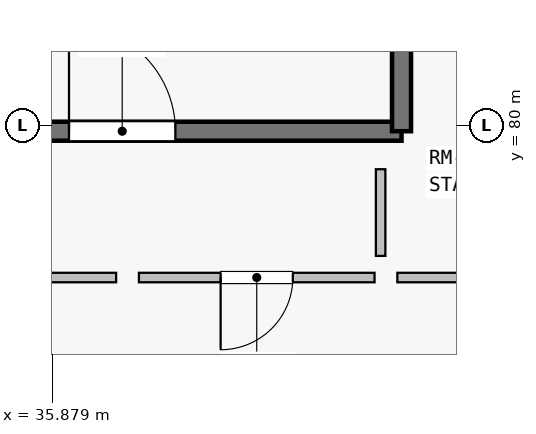
"""IFC4 building model, lengths in metres.
Left out: names, types, materials, properties, quantities, classifications, styles, units other than length and angle.
Written with IfcOpenShell. Run it as: python <this file> out.ifc"""

import sys

from ifc_helpers import new_model, si_unit, direction, frame, frame_2d, origin, place, context, subcontext, project, spatial, rectangle, extrude, element, fill, save


model = new_model("IFC4")
c1 = context("Model", 3, precision=1e-05, world=origin(), true_north=direction((0.0, 1.0)))
c2 = subcontext(c1, "Body", "Model", "MODEL_VIEW")
j1 = project(units=[si_unit("LENGTHUNIT", "METRE"), si_unit("PLANEANGLEUNIT", "RADIAN")], contexts=[c1])
p1 = place(None, origin())
s1 = spatial("IfcSite", under=j1, at=p1, CompositionType="ELEMENT")
p2 = place(p1, origin())
s2 = spatial("IfcBuilding", under=s1, at=p2, CompositionType="ELEMENT")
p3 = place(p2, frame((0.0, 0.0, 5.4)))
s3 = spatial("IfcBuildingStorey", under=s2, at=p3, CompositionType="ELEMENT", Elevation=5.4)
p4 = place(p3, frame((33.125, 79.925, 0.0), z_axis=(0.0, 0.0, 1.0), x_axis=(1.0, 0.0, 0.0)))
e1 = element("IfcWall", 1, at=p4, inside=s3, PredefinedType="SHEAR", context=c2, shape_type="SweptSolid", body=[
    extrude(rectangle(XDim=7.35, YDim=0.25, at=frame_2d((3.675, 0.0))), origin(), (0.0, 0.0, 1.0), 4.5),
])
p5 = place(p4, frame((2.975, 0.0, 0.0)))
e2 = element("IfcOpeningElement", 2, at=p5, cuts=e1, PredefinedType="OPENING", context=c2, shape_type="SweptSolid", body=[
    extrude(rectangle(XDim=1.4, YDim=2.2, at=frame_2d((0.7, 1.1))), frame((0.0, 0.135, 0.0), z_axis=(0.0, -1.0, 0.0), x_axis=(1.0, 0.0, 0.0)), (0.0, 0.0, 1.0), 0.27),
])
p6 = place(p3, frame((40.475, 79.925, 0.0), z_axis=(0.0, 0.0, 1.0), x_axis=(0.0, 1.0, 0.0)))
e3 = element("IfcWall", 3, at=p6, inside=s3, PredefinedType="SHEAR", context=c2, shape_type="SweptSolid", body=[
    extrude(rectangle(XDim=12.75, YDim=0.25, at=frame_2d((6.375, 0.0))), origin(), (0.0, 0.0, 1.0), 4.5),
])
p7 = place(p3, frame((36.72, 78.0, 0.0), z_axis=(0.0, 0.0, 1.0), x_axis=(-1.0, 0.0, 0.0)))
e4 = element("IfcWall", 4, at=p7, inside=s3, PredefinedType="PARTITIONING", context=c2, shape_type="SweptSolid", body=[
    extrude(rectangle(XDim=4.035, YDim=0.125, at=frame_2d((2.018, 0.0))), origin(), (0.0, 0.0, 1.0), 4.23),
])
p8 = place(p3, frame((40.12, 78.0, 0.0), z_axis=(0.0, 0.0, 1.0), x_axis=(-1.0, 0.0, 0.0)))
e5 = element("IfcWall", 5, at=p8, inside=s3, PredefinedType="PARTITIONING", context=c2, shape_type="SweptSolid", body=[
    extrude(rectangle(XDim=3.1, YDim=0.125, at=frame_2d((1.55, 0.0))), origin(), (0.0, 0.0, 1.0), 4.23),
])
p9 = place(p8, frame((1.075, 0.0, 0.0)))
e6 = element("IfcOpeningElement", 6, at=p9, cuts=e5, PredefinedType="OPENING", context=c2, shape_type="SweptSolid", body=[
    extrude(rectangle(XDim=0.95, YDim=2.1, at=frame_2d((0.475, 1.05))), frame((0.0, 0.073, 0.0), z_axis=(0.0, -1.0, 0.0), x_axis=(1.0, 0.0, 0.0)), (0.0, 0.0, 1.0), 0.145),
])
p10 = place(p3, frame((40.2, 79.425, 0.0), z_axis=(0.0, 0.0, 1.0), x_axis=(0.0, -1.0, 0.0)))
e7 = element("IfcWall", 7, at=p10, inside=s3, PredefinedType="PARTITIONING", context=c2, shape_type="SweptSolid", body=[
    extrude(rectangle(XDim=1.14, YDim=0.125, at=frame_2d((0.57, 0.0))), origin(), (0.0, 0.0, 1.0), 4.23),
])
p11 = place(p3, frame((43.52, 78.0, 0.0), z_axis=(0.0, 0.0, 1.0), x_axis=(-1.0, 0.0, 0.0)))
e8 = element("IfcWall", 8, at=p11, inside=s3, PredefinedType="PARTITIONING", context=c2, shape_type="SweptSolid", body=[
    extrude(rectangle(XDim=3.1, YDim=0.125, at=frame_2d((1.55, 0.0))), origin(), (0.0, 0.0, 1.0), 3.505),
])
p12 = place(p5, origin())
e9 = element("IfcDoor", 9, at=p12, inside=s3, OperationType="SINGLE_SWING_LEFT", PredefinedType="DOOR", context=c2, shape_type="SweptSolid", body=[
    extrude(rectangle(XDim=1.4, YDim=2.2, at=frame_2d((0.7, 1.1))), frame((0.0, 0.025, 0.0), z_axis=(0.0, -1.0, 0.0), x_axis=(1.0, 0.0, 0.0)), (0.0, 0.0, 1.0), 0.05),
])
fill(e2, e9)
p13 = place(p9, origin())
e10 = element("IfcDoor", 10, at=p13, inside=s3, OperationType="SINGLE_SWING_RIGHT", PredefinedType="DOOR", context=c2, shape_type="SweptSolid", body=[
    extrude(rectangle(XDim=0.95, YDim=2.1, at=frame_2d((0.475, 1.05))), frame((0.0, 0.025, 0.0), z_axis=(0.0, -1.0, 0.0), x_axis=(1.0, 0.0, 0.0)), (0.0, 0.0, 1.0), 0.05),
])
fill(e6, e10)
save(model, sys.argv[1])
